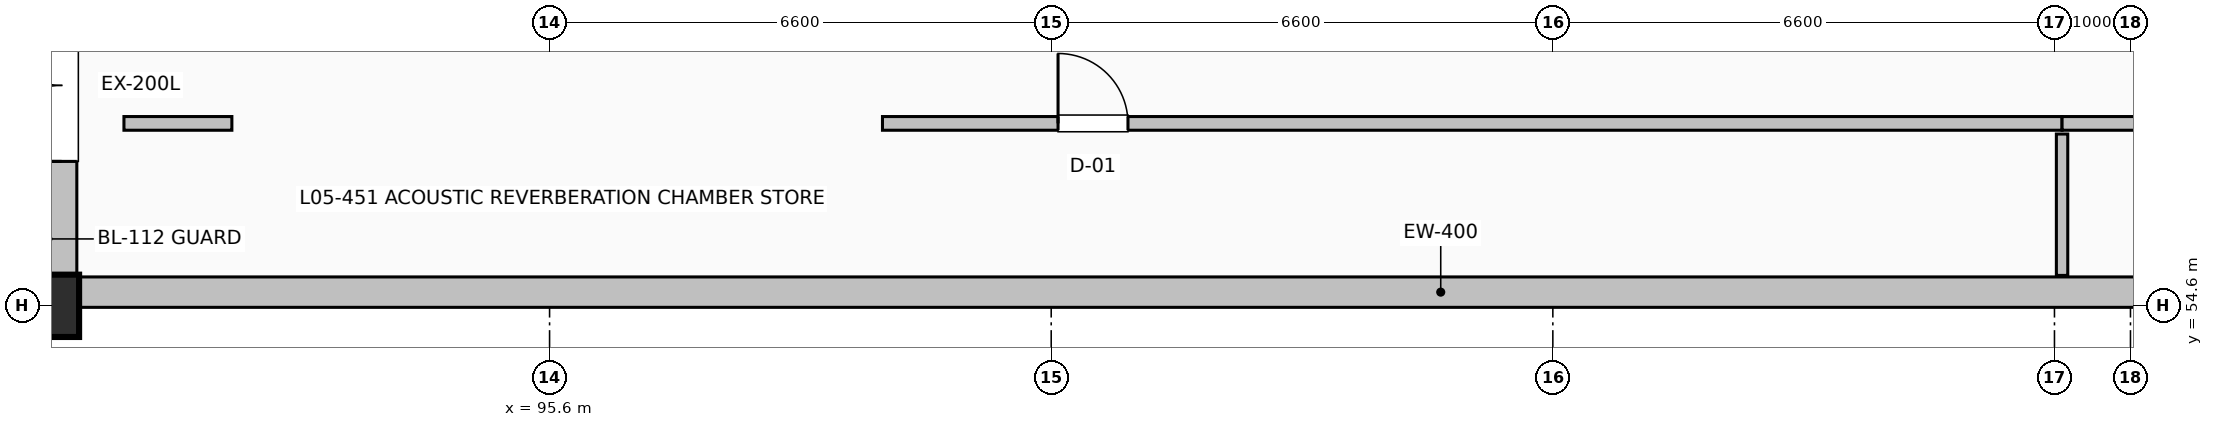
"""IFC4 building model, lengths in metres.
Left out: names, types, materials, properties, quantities, classifications, styles, units other than length and angle.
Written with IfcOpenShell. Run it as: python <this file> out.ifc"""

import sys

from ifc_helpers import new_model, si_unit, direction, frame, frame_2d, origin, origin_2d, place, context, subcontext, project, spatial, rectangle, extrude, element, fill, save


model = new_model("IFC4")
c1 = context("Model", 3, precision=1e-05, world=origin(), true_north=direction((0.0, 1.0)))
c2 = subcontext(c1, "Body", "Model", "MODEL_VIEW")
j1 = project(units=[si_unit("LENGTHUNIT", "METRE"), si_unit("PLANEANGLEUNIT", "RADIAN")], contexts=[c1])
p1 = place(None, origin())
s1 = spatial("IfcSite", under=j1, at=p1, CompositionType="ELEMENT")
p2 = place(p1, origin())
s2 = spatial("IfcBuilding", under=s1, at=p2, CompositionType="ELEMENT")
p3 = place(p2, frame((0.0, 0.0, 24.0)))
s3 = spatial("IfcBuildingStorey", under=s2, at=p3, CompositionType="ELEMENT", Elevation=24.0)
p4 = place(p3, frame((89.0, 54.6, 0.0), z_axis=(0.0, 0.0, 1.0), x_axis=(1.0, 0.0, 0.0)))
e1 = element("IfcColumn", 1, at=p4, inside=s3, PredefinedType="COLUMN", context=c2, shape_type="SweptSolid", body=[
    extrude(rectangle(XDim=0.82, YDim=0.82, at=origin_2d()), origin(), (0.0, 0.0, 1.0), 4.5),
])
p5 = place(p3, frame((89.18, 55.01, 0.0), z_axis=(0.0, 0.0, 1.0), x_axis=(0.0, 1.0, 0.0)))
e2 = element("IfcWall", 2, at=p5, inside=s3, PredefinedType="SOLIDWALL", context=c2, shape_type="SweptSolid", body=[
    extrude(rectangle(XDim=7.08, YDim=0.4, at=frame_2d((3.54, 0.0))), origin(), (0.0, 0.0, 1.0), 4.2),
])
p6 = place(p5, frame((1.49, 0.0, 0.0)))
e3 = element("IfcOpeningElement", 3, at=p6, cuts=e2, PredefinedType="OPENING", context=c2, shape_type="SweptSolid", body=[
    extrude(rectangle(XDim=2.0, YDim=2.1, at=frame_2d((1.0, 1.05))), frame((0.0, 0.21, 0.0), z_axis=(0.0, -1.0, 0.0), x_axis=(1.0, 0.0, 0.0)), (0.0, 0.0, 1.0), 0.42),
])
p7 = place(p3, frame((141.8, 54.78, 0.0), z_axis=(0.0, 0.0, 1.0), x_axis=(-1.0, 0.0, 0.0)))
e4 = element("IfcWall", 4, at=p7, inside=s3, PredefinedType="SOLIDWALL", context=c2, shape_type="SweptSolid", body=[
    extrude(rectangle(XDim=52.39, YDim=0.4, at=frame_2d((26.195, 0.0))), origin(), (0.0, 0.0, 1.0), 4.2),
])
p8 = place(p3, frame((90.0, 57.0, 0.0), z_axis=(0.0, 0.0, 1.0), x_axis=(1.0, 0.0, 0.0)))
e5 = element("IfcWall", 5, at=p8, inside=s3, PredefinedType="PARTITIONING", context=c2, shape_type="SweptSolid", body=[
    extrude(rectangle(XDim=1.42, YDim=0.18, at=frame_2d((0.71, 0.0))), origin(), (0.0, 0.0, 1.0), 4.192),
])
p9 = place(p3, frame((99.98, 57.0, 0.0), z_axis=(0.0, 0.0, 1.0), x_axis=(1.0, 0.0, 0.0)))
e6 = element("IfcWall", 6, at=p9, inside=s3, PredefinedType="PARTITIONING", context=c2, shape_type="SweptSolid", body=[
    extrude(rectangle(XDim=15.52, YDim=0.18, at=frame_2d((7.76, 0.0))), origin(), (0.0, 0.0, 1.0), 4.192),
])
p10 = place(p9, frame((2.31, 0.0, 0.0)))
e7 = element("IfcOpeningElement", 7, at=p10, cuts=e6, PredefinedType="OPENING", context=c2, shape_type="SweptSolid", body=[
    extrude(rectangle(XDim=0.92, YDim=2.05, at=frame_2d((0.46, 1.025))), frame((0.0, 0.1, 0.0), z_axis=(0.0, -1.0, 0.0), x_axis=(1.0, 0.0, 0.0)), (0.0, 0.0, 1.0), 0.2),
])
p11 = place(p3, frame((115.5, 55.0, 0.0), z_axis=(0.0, 0.0, 1.0), x_axis=(0.0, 1.0, 0.0)))
e8 = element("IfcWall", 8, at=p11, inside=s3, PredefinedType="PARTITIONING", context=c2, shape_type="SweptSolid", body=[
    extrude(rectangle(XDim=1.86, YDim=0.15, at=frame_2d((0.93, 0.0))), origin(), (0.0, 0.0, 1.0), 4.192),
])
p12 = place(p3, frame((115.5, 57.0, 0.0), z_axis=(0.0, 0.0, 1.0), x_axis=(1.0, 0.0, 0.0)))
e9 = element("IfcWall", 9, at=p12, inside=s3, PredefinedType="PARTITIONING", context=c2, shape_type="SweptSolid", body=[
    extrude(rectangle(XDim=25.5, YDim=0.18, at=frame_2d((12.75, 0.0))), origin(), (0.0, 0.0, 1.0), 4.192),
])
p13 = place(p12, frame((12.29, 0.0, 0.0)))
e10 = element("IfcOpeningElement", 10, at=p13, cuts=e9, PredefinedType="OPENING", context=c2, shape_type="SweptSolid", body=[
    extrude(rectangle(XDim=0.92, YDim=2.05, at=frame_2d((0.46, 1.025))), frame((0.0, 0.1, 0.0), z_axis=(0.0, -1.0, 0.0), x_axis=(1.0, 0.0, 0.0)), (0.0, 0.0, 1.0), 0.2),
])
p14 = place(p6, origin())
e11 = element("IfcDoor", 11, at=p14, inside=s3, OperationType="DOUBLE_DOOR_SINGLE_SWING", PredefinedType="DOOR", context=c2, shape_type="SweptSolid", body=[
    extrude(rectangle(XDim=2.0, YDim=2.1, at=frame_2d((1.0, 1.05))), frame((0.0, 0.025, 0.0), z_axis=(0.0, -1.0, 0.0), x_axis=(1.0, 0.0, 0.0)), (0.0, 0.0, 1.0), 0.05),
])
fill(e3, e11)
p15 = place(p10, origin())
e12 = element("IfcDoor", 12, at=p15, inside=s3, OperationType="SINGLE_SWING_LEFT", PredefinedType="DOOR", context=c2, shape_type="SweptSolid", body=[
    extrude(rectangle(XDim=0.92, YDim=2.05, at=frame_2d((0.46, 1.025))), frame((0.0, 0.025, 0.0), z_axis=(0.0, -1.0, 0.0), x_axis=(1.0, 0.0, 0.0)), (0.0, 0.0, 1.0), 0.05),
])
fill(e7, e12)
save(model, sys.argv[1])
